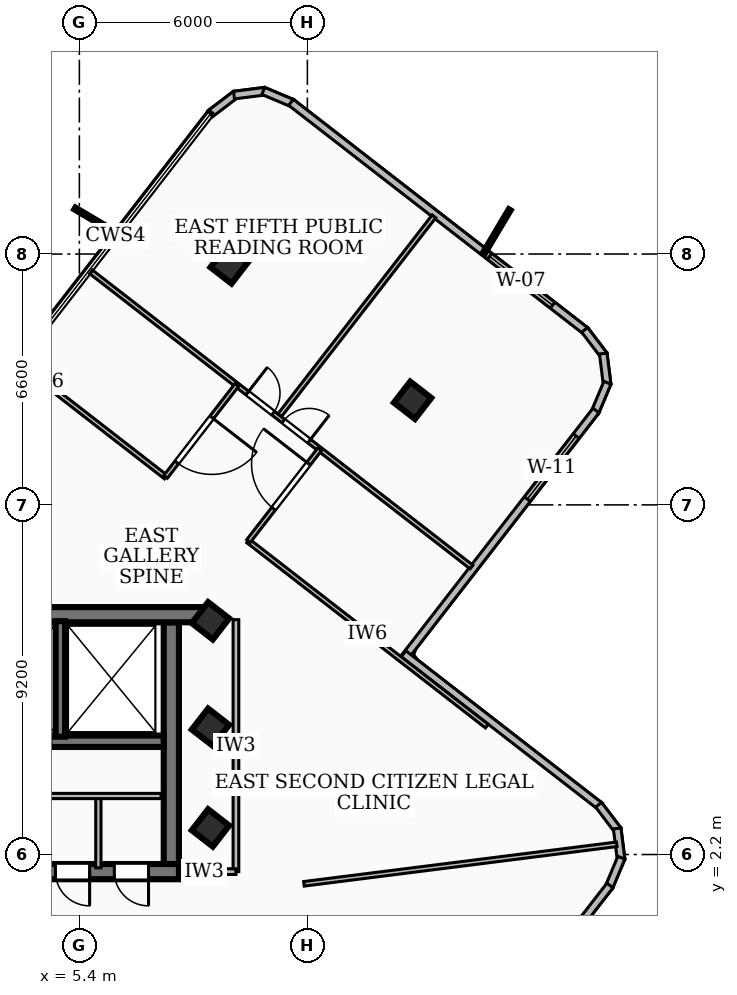
"""IFC4 building model, lengths in metres.
Left out: names, types, materials, properties, quantities, classifications, styles, units other than length and angle.
Written with IfcOpenShell. Run it as: python <this file> out.ifc"""

import sys

from ifc_helpers import new_model, si_unit, direction, frame, frame_2d, origin, origin_2d, place, context, subcontext, project, spatial, rectangle, extrude, element, fill, save


model = new_model("IFC4")
c1 = context("Model", 3, precision=1e-05, world=origin(), true_north=direction((0.0, 1.0)))
c2 = subcontext(c1, "Body", "Model", "MODEL_VIEW")
j1 = project(units=[si_unit("LENGTHUNIT", "METRE"), si_unit("PLANEANGLEUNIT", "RADIAN")], contexts=[c1])
p1 = place(None, origin())
s1 = spatial("IfcSite", under=j1, at=p1, CompositionType="ELEMENT")
p2 = place(p1, origin())
s2 = spatial("IfcBuilding", under=s1, at=p2, CompositionType="ELEMENT")
p3 = place(p2, frame((0.0, 0.0, 261.18)))
s3 = spatial("IfcBuildingStorey", under=s2, at=p3, CompositionType="ELEMENT", Elevation=261.18)
p4 = place(p3, frame((-8.78, 8.51, 0.0), z_axis=(0.0, 0.0, 1.0), x_axis=(1.0, 0.0, 0.0)))
e1 = element("IfcWall", 1, at=p4, inside=s3, PredefinedType="SHEAR", context=c2, shape_type="SweptSolid", body=[
    extrude(rectangle(XDim=17.56, YDim=0.4, at=frame_2d((8.78, 0.0))), origin(), (0.0, 0.0, 1.0), 3.16),
])
p5 = place(p3, frame((8.02, 1.75, 0.0), z_axis=(0.0, 0.0, 1.0), x_axis=(-1.0, 0.0, 0.0)))
e2 = element("IfcWall", 2, at=p5, inside=s3, PredefinedType="SHEAR", context=c2, shape_type="SweptSolid", body=[
    extrude(rectangle(XDim=16.04, YDim=0.4, at=frame_2d((8.02, 0.0))), origin(), (0.0, 0.0, 1.0), 3.16),
])
p6 = place(p5, frame((7.45, 0.0, 0.0)))
e3 = element("IfcOpeningElement", 3, at=p6, cuts=e2, PredefinedType="OPENING", context=c2, shape_type="SweptSolid", body=[
    extrude(rectangle(XDim=1.0, YDim=2.1, at=frame_2d((0.5, 1.05))), frame((0.0, 0.21, 0.0), z_axis=(0.0, -1.0, 0.0), x_axis=(1.0, 0.0, 0.0)), (0.0, 0.0, 1.0), 0.42),
])
p7 = place(p5, frame((14.285, 0.0, 0.0)))
e4 = element("IfcOpeningElement", 4, at=p7, cuts=e2, PredefinedType="OPENING", context=c2, shape_type="SweptSolid", body=[
    extrude(rectangle(XDim=1.05, YDim=2.15, at=frame_2d((0.525, 1.075))), frame((0.0, 0.21, 0.0), z_axis=(0.0, -1.0, 0.0), x_axis=(1.0, 0.0, 0.0)), (0.0, 0.0, 1.0), 0.42),
])
p8 = place(p5, frame((12.725, 0.0, 0.0)))
e5 = element("IfcOpeningElement", 5, at=p8, cuts=e2, PredefinedType="OPENING", context=c2, shape_type="SweptSolid", body=[
    extrude(rectangle(XDim=1.05, YDim=2.15, at=frame_2d((0.525, 1.075))), frame((0.0, 0.21, 0.0), z_axis=(0.0, -1.0, 0.0), x_axis=(1.0, 0.0, 0.0)), (0.0, 0.0, 1.0), 0.42),
])
p9 = place(p5, frame((11.165, 0.0, 0.0)))
e6 = element("IfcOpeningElement", 6, at=p9, cuts=e2, PredefinedType="OPENING", context=c2, shape_type="SweptSolid", body=[
    extrude(rectangle(XDim=1.05, YDim=2.15, at=frame_2d((0.525, 1.075))), frame((0.0, 0.21, 0.0), z_axis=(0.0, -1.0, 0.0), x_axis=(1.0, 0.0, 0.0)), (0.0, 0.0, 1.0), 0.42),
])
p10 = place(p5, frame((3.85, 0.0, 0.0)))
e7 = element("IfcOpeningElement", 7, at=p10, cuts=e2, PredefinedType="OPENING", context=c2, shape_type="SweptSolid", body=[
    extrude(rectangle(XDim=0.9, YDim=2.06, at=frame_2d((0.45, 1.03))), frame((0.0, 0.21, 0.0), z_axis=(0.0, -1.0, 0.0), x_axis=(1.0, 0.0, 0.0)), (0.0, 0.0, 1.0), 0.42),
])
p11 = place(p5, frame((2.35, 0.0, 0.0)))
e8 = element("IfcOpeningElement", 8, at=p11, cuts=e2, PredefinedType="OPENING", context=c2, shape_type="SweptSolid", body=[
    extrude(rectangle(XDim=0.9, YDim=2.06, at=frame_2d((0.45, 1.03))), frame((0.0, 0.21, 0.0), z_axis=(0.0, -1.0, 0.0), x_axis=(1.0, 0.0, 0.0)), (0.0, 0.0, 1.0), 0.42),
])
p12 = place(p5, frame((0.8, 0.0, 0.0)))
e9 = element("IfcOpeningElement", 9, at=p12, cuts=e2, PredefinedType="OPENING", context=c2, shape_type="SweptSolid", body=[
    extrude(rectangle(XDim=0.9, YDim=2.06, at=frame_2d((0.45, 1.03))), frame((0.0, 0.21, 0.0), z_axis=(0.0, -1.0, 0.0), x_axis=(1.0, 0.0, 0.0)), (0.0, 0.0, 1.0), 0.42),
])
p13 = place(p3, frame((7.82, 8.31, 0.0), z_axis=(0.0, 0.0, 1.0), x_axis=(0.0, -1.0, 0.0)))
e10 = element("IfcWall", 10, at=p13, inside=s3, PredefinedType="SHEAR", context=c2, shape_type="SweptSolid", body=[
    extrude(rectangle(XDim=6.36, YDim=0.4, at=frame_2d((3.18, 0.0))), origin(), (0.0, 0.0, 1.0), 3.16),
])
p14 = place(p3, frame((7.62, 5.18, 0.0), z_axis=(0.0, 0.0, 1.0), x_axis=(-1.0, 0.0, 0.0)))
e11 = element("IfcWall", 11, at=p14, inside=s3, PredefinedType="SOLIDWALL", context=c2, shape_type="SweptSolid", body=[
    extrude(rectangle(XDim=15.24, YDim=0.3, at=frame_2d((7.62, 0.0))), origin(), (0.0, 0.0, 1.0), 3.16),
])
p15 = place(p14, frame((5.77, 0.0, 0.0)))
e12 = element("IfcOpeningElement", 12, at=p15, cuts=e11, PredefinedType="OPENING", context=c2, shape_type="SweptSolid", body=[
    extrude(rectangle(XDim=1.1, YDim=2.15, at=frame_2d((0.55, 1.075))), frame((0.0, 0.16, 0.0), z_axis=(0.0, -1.0, 0.0), x_axis=(1.0, 0.0, 0.0)), (0.0, 0.0, 1.0), 0.32),
])
p16 = place(p14, frame((2.97, 0.0, 0.0)))
e13 = element("IfcOpeningElement", 13, at=p16, cuts=e11, PredefinedType="OPENING", context=c2, shape_type="SweptSolid", body=[
    extrude(rectangle(XDim=1.1, YDim=2.15, at=frame_2d((0.55, 1.075))), frame((0.0, 0.16, 0.0), z_axis=(0.0, -1.0, 0.0), x_axis=(1.0, 0.0, 0.0)), (0.0, 0.0, 1.0), 0.32),
])
p17 = place(p14, frame((7.97, 0.0, 0.0)))
e14 = element("IfcOpeningElement", 14, at=p17, cuts=e11, PredefinedType="OPENING", context=c2, shape_type="SweptSolid", body=[
    extrude(rectangle(XDim=1.0, YDim=2.1, at=frame_2d((0.5, 1.05))), frame((0.0, 0.16, 0.0), z_axis=(0.0, -1.0, 0.0), x_axis=(1.0, 0.0, 0.0)), (0.0, 0.0, 1.0), 0.32),
])
p18 = place(p3, frame((4.9, 5.3, 0.0), z_axis=(0.0, 0.0, 1.0), x_axis=(0.0, 1.0, 0.0)))
e15 = element("IfcWall", 15, at=p18, inside=s3, PredefinedType="SOLIDWALL", context=c2, shape_type="SweptSolid", body=[
    extrude(rectangle(XDim=3.04, YDim=0.25, at=frame_2d((1.52, 0.0))), origin(), (0.0, 0.0, 1.0), 3.16),
])
for number, where, z_axis, x_axis in (
    (16, (8.85, 2.9, 0.0), (0.0, 0.0, 1.0), (0.613, 0.79, 0.0)),
    (17, (8.85, 5.55, 0.0), (0.0, 0.0, 1.0), (0.613, 0.79, 0.0)),
    (18, (8.85, 8.35, 0.0), (0.0, 0.0, 1.0), (0.613, 0.79, 0.0)),
    (19, (14.169, 14.152, 0.0), (0.0, 0.0, 1.0), (0.613, 0.79, 0.0)),
    (20, (9.341, 17.714, 0.0), (0.0, 0.0, 1.0), (0.613, 0.79, 0.0)),
):
    element("IfcColumn", number, at=place(p3, frame(where, z_axis=z_axis, x_axis=x_axis)), inside=s3, PredefinedType="COLUMN", context=c2, shape_type="SweptSolid", body=[
        extrude(rectangle(XDim=0.7, YDim=0.7, at=origin_2d()), origin(), (0.0, 0.0, 1.0), 3.42),
    ])
p19 = place(p3, frame((8.846, 21.693, 0.0), z_axis=(0.0, 0.0, 1.0), x_axis=(0.796633253556, 0.604462951163, 0.0)))
e21 = element("IfcWall", 21, at=p19, inside=s3, PredefinedType="SOLIDWALL", context=c2, shape_type="SweptSolid", body=[
    extrude(rectangle(XDim=0.838, YDim=0.2, at=frame_2d((0.419, 0.0))), origin(), (0.0, 0.0, 1.0), 3.16),
])
p20 = place(p3, frame((9.469, 22.182, 0.0), z_axis=(0.0, 0.0, 1.0), x_axis=(0.992163581644, 0.124945697241, 0.0)))
e22 = element("IfcWall", 22, at=p20, inside=s3, PredefinedType="SOLIDWALL", context=c2, shape_type="SweptSolid", body=[
    extrude(rectangle(XDim=0.824, YDim=0.2, at=frame_2d((0.412, 0.0))), origin(), (0.0, 0.0, 1.0), 3.16),
])
p21 = place(p3, frame((10.239, 22.292, 0.0), z_axis=(0.0, 0.0, 1.0), x_axis=(0.92184898946, -0.387549275101, 0.0)))
e23 = element("IfcWall", 23, at=p21, inside=s3, PredefinedType="SOLIDWALL", context=c2, shape_type="SweptSolid", body=[
    extrude(rectangle(XDim=0.838, YDim=0.2, at=frame_2d((0.419, 0.0))), origin(), (0.0, 0.0, 1.0), 3.16),
])
p22 = place(p3, frame((10.969, 21.992, 0.0), z_axis=(0.0, 0.0, 1.0), x_axis=(0.790145127041, -0.612919797537, 0.0)))
e24 = element("IfcWall", 24, at=p22, inside=s3, PredefinedType="SOLIDWALL", context=c2, shape_type="SweptSolid", body=[
    extrude(rectangle(XDim=9.823, YDim=0.2, at=frame_2d((4.912, 0.0))), origin(), (0.0, 0.0, 1.0), 3.16),
])
p23 = place(p22, frame((6.612, 0.0, 0.85)))
e25 = element("IfcOpeningElement", 25, at=p23, cuts=e24, PredefinedType="OPENING", context=c2, shape_type="SweptSolid", body=[
    extrude(rectangle(XDim=2.1, YDim=1.8, at=frame_2d((1.05, 0.9))), frame((0.0, 0.11, 0.0), z_axis=(0.0, -1.0, 0.0), x_axis=(1.0, 0.0, 0.0)), (0.0, 0.0, 1.0), 0.22),
])
p24 = place(p3, frame((18.696, 16.006, 0.0), z_axis=(0.0, 0.0, 1.0), x_axis=(0.604322767077, -0.796739601873, 0.0)))
e26 = element("IfcWall", 26, at=p24, inside=s3, PredefinedType="SOLIDWALL", context=c2, shape_type="SweptSolid", body=[
    extrude(rectangle(XDim=0.839, YDim=0.2, at=frame_2d((0.419, 0.0))), origin(), (0.0, 0.0, 1.0), 3.16),
])
p25 = place(p3, frame((19.185, 15.383, 0.0), z_axis=(0.0, 0.0, 1.0), x_axis=(0.124945697241, -0.992163581644, 0.0)))
e27 = element("IfcWall", 27, at=p25, inside=s3, PredefinedType="SOLIDWALL", context=c2, shape_type="SweptSolid", body=[
    extrude(rectangle(XDim=0.824, YDim=0.2, at=frame_2d((0.412, 0.0))), origin(), (0.0, 0.0, 1.0), 3.16),
])
p26 = place(p3, frame((19.295, 14.613, 0.0), z_axis=(0.0, 0.0, 1.0), x_axis=(-0.387549275101, -0.92184898946, 0.0)))
e28 = element("IfcWall", 28, at=p26, inside=s3, PredefinedType="SOLIDWALL", context=c2, shape_type="SweptSolid", body=[
    extrude(rectangle(XDim=0.838, YDim=0.2, at=frame_2d((0.419, 0.0))), origin(), (0.0, 0.0, 1.0), 3.16),
])
p27 = place(p3, frame((18.995, 13.883, 0.0), z_axis=(0.0, 0.0, 1.0), x_axis=(-0.612894114019, -0.790165049215, 0.0)))
e29 = element("IfcWall", 29, at=p27, inside=s3, PredefinedType="SOLIDWALL", context=c2, shape_type="SweptSolid", body=[
    extrude(rectangle(XDim=8.241, YDim=0.2, at=frame_2d((4.121, 0.0))), origin(), (0.0, 0.0, 1.0), 3.16),
])
p28 = place(p27, frame((0.85, 0.0, 0.85)))
e30 = element("IfcOpeningElement", 30, at=p28, cuts=e29, PredefinedType="OPENING", context=c2, shape_type="SweptSolid", body=[
    extrude(rectangle(XDim=2.1, YDim=1.6, at=frame_2d((1.05, 0.8))), frame((0.0, 0.11, 0.0), z_axis=(0.0, -1.0, 0.0), x_axis=(1.0, 0.0, 0.0)), (0.0, 0.0, 1.0), 0.22),
])
p29 = place(p3, frame((13.93, 7.483, 0.0), z_axis=(0.0, 0.0, 1.0), x_axis=(0.790217588081, -0.612826373036, 0.0)))
e31 = element("IfcWall", 31, at=p29, inside=s3, PredefinedType="SOLIDWALL", context=c2, shape_type="SweptSolid", body=[
    extrude(rectangle(XDim=6.542, YDim=0.2, at=frame_2d((3.271, 0.0))), origin(), (0.0, 0.0, 1.0), 3.16),
])
p30 = place(p3, frame((19.064, 3.509, 0.0), z_axis=(0.0, 0.0, 1.0), x_axis=(0.603908166539, -0.797053904317, 0.0)))
e32 = element("IfcWall", 32, at=p30, inside=s3, PredefinedType="SOLIDWALL", context=c2, shape_type="SweptSolid", body=[
    extrude(rectangle(XDim=0.838, YDim=0.2, at=frame_2d((0.419, 0.0))), origin(), (0.0, 0.0, 1.0), 3.16),
])
p31 = place(p3, frame((19.552, 2.886, 0.0), z_axis=(0.0, 0.0, 1.0), x_axis=(0.124799052175, -0.992182038023, 0.0)))
e33 = element("IfcWall", 33, at=p31, inside=s3, PredefinedType="SOLIDWALL", context=c2, shape_type="SweptSolid", body=[
    extrude(rectangle(XDim=0.825, YDim=0.2, at=frame_2d((0.413, 0.0))), origin(), (0.0, 0.0, 1.0), 3.16),
])
p32 = place(p3, frame((19.662, 2.115, 0.0), z_axis=(0.0, 0.0, 1.0), x_axis=(-0.388213349612, -0.921569528133, 0.0)))
e34 = element("IfcWall", 34, at=p32, inside=s3, PredefinedType="SOLIDWALL", context=c2, shape_type="SweptSolid", body=[
    extrude(rectangle(XDim=0.838, YDim=0.2, at=frame_2d((0.419, 0.0))), origin(), (0.0, 0.0, 1.0), 3.16),
])
p33 = place(p3, frame((19.362, 1.386, 0.0), z_axis=(0.0, 0.0, 1.0), x_axis=(-0.613007625303, -0.790076990755, 0.0)))
e35 = element("IfcWall", 35, at=p33, inside=s3, PredefinedType="SOLIDWALL", context=c2, shape_type="SweptSolid", body=[
    extrude(rectangle(XDim=6.742, YDim=0.2, at=frame_2d((3.371, 0.0))), origin(), (0.0, 0.0, 1.0), 3.16),
])
p34 = place(p3, frame((2.9, 3.74, 0.0), z_axis=(0.0, 0.0, 1.0), x_axis=(1.0, 0.0, 0.0)))
e36 = element("IfcWall", 36, at=p34, inside=s3, PredefinedType="PARTITIONING", context=c2, shape_type="SweptSolid", body=[
    extrude(rectangle(XDim=4.65, YDim=0.138, at=frame_2d((2.325, 0.0))), origin(), (0.0, 0.0, 1.0), 3.16),
])
p35 = place(p3, frame((5.9, 1.85, 0.0), z_axis=(0.0, 0.0, 1.0), x_axis=(0.0, 1.0, 0.0)))
e37 = element("IfcWall", 37, at=p35, inside=s3, PredefinedType="PARTITIONING", context=c2, shape_type="SweptSolid", body=[
    extrude(rectangle(XDim=1.89, YDim=0.138, at=frame_2d((0.945, 0.0))), origin(), (0.0, 0.0, 1.0), 2.39),
])
p36 = place(p3, frame((9.52, 1.75, 0.0), z_axis=(0.0, 0.0, 1.0), x_axis=(0.0, 1.0, 0.0)))
e38 = element("IfcWall", 38, at=p36, inside=s3, PredefinedType="PARTITIONING", context=c2, shape_type="SweptSolid", body=[
    extrude(rectangle(XDim=6.63, YDim=0.15, at=frame_2d((3.315, 0.0))), origin(), (0.0, 0.0, 1.0), 3.16),
])
p37 = place(p3, frame((7.85, 1.75, 0.0), z_axis=(0.0, 0.0, 1.0), x_axis=(1.0, 0.0, 0.0)))
e39 = element("IfcWall", 39, at=p37, inside=s3, PredefinedType="PARTITIONING", context=c2, shape_type="SweptSolid", body=[
    extrude(rectangle(XDim=1.67, YDim=0.15, at=frame_2d((0.835, 0.0))), origin(), (0.0, 0.0, 1.0), 2.39),
])
p38 = place(p3, frame((11.31, 1.429, 0.0), z_axis=(0.0, 0.0, 1.0), x_axis=(0.992107592132, 0.125389495712, 0.0)))
e40 = element("IfcWall", 40, at=p38, inside=s3, PredefinedType="PARTITIONING", context=c2, shape_type="SweptSolid", body=[
    extrude(rectangle(XDim=8.294, YDim=0.12, at=frame_2d((4.147, 0.0))), origin(), (0.0, 0.0, 1.0), 3.16),
])
p39 = place(p3, frame((7.676, 12.131, 0.0), z_axis=(0.0, 0.0, 1.0), x_axis=(-0.790137186805, 0.61293003355, 0.0)))
e41 = element("IfcWall", 41, at=p39, inside=s3, PredefinedType="PARTITIONING", context=c2, shape_type="SweptSolid", body=[
    extrude(rectangle(XDim=8.149, YDim=0.12, at=frame_2d((4.075, 0.0))), origin(), (0.0, 0.0, 1.0), 3.16),
])
p40 = place(p3, frame((16.122, 5.578, 0.0), z_axis=(0.0, 0.0, 1.0), x_axis=(-0.7900346363, 0.613062210094, 0.0)))
e42 = element("IfcWall", 42, at=p40, inside=s3, PredefinedType="PARTITIONING", context=c2, shape_type="SweptSolid", body=[
    extrude(rectangle(XDim=7.95, YDim=0.12, at=frame_2d((3.975, 0.0))), origin(), (0.0, 0.0, 1.0), 2.53),
])
p41 = place(p3, frame((9.544, 14.555, 0.0), z_axis=(0.0, 0.0, 1.0), x_axis=(-0.612990234131, -0.79009048397, 0.0)))
e43 = element("IfcWall", 43, at=p41, inside=s3, PredefinedType="PARTITIONING", context=c2, shape_type="SweptSolid", body=[
    extrude(rectangle(XDim=3.06, YDim=0.12, at=frame_2d((1.53, 0.0))), origin(), (0.0, 0.0, 1.0), 2.53),
])
p42 = place(p41, frame((1.08, 0.0, 0.0)))
e44 = element("IfcOpeningElement", 44, at=p42, cuts=e43, PredefinedType="OPENING", context=c2, shape_type="SweptSolid", body=[
    extrude(rectangle(XDim=1.5, YDim=2.12, at=frame_2d((0.75, 1.06))), frame((0.0, 0.07, 0.0), z_axis=(0.0, -1.0, 0.0), x_axis=(1.0, 0.0, 0.0)), (0.0, 0.0, 1.0), 0.14),
])
p43 = place(p3, frame((9.849, 10.446, 0.0), z_axis=(0.0, 0.0, 1.0), x_axis=(0.612945563076, 0.790125139902, 0.0)))
e45 = element("IfcWall", 45, at=p43, inside=s3, PredefinedType="PARTITIONING", context=c2, shape_type="SweptSolid", body=[
    extrude(rectangle(XDim=3.059, YDim=0.12, at=frame_2d((1.53, 0.0))), origin(), (0.0, 0.0, 1.0), 3.16),
])
p44 = place(p43, frame((1.08, 0.0, 0.0)))
e46 = element("IfcOpeningElement", 46, at=p44, cuts=e45, PredefinedType="OPENING", context=c2, shape_type="SweptSolid", body=[
    extrude(rectangle(XDim=1.5, YDim=2.12, at=frame_2d((0.75, 1.06))), frame((0.0, 0.07, 0.0), z_axis=(0.0, -1.0, 0.0), x_axis=(1.0, 0.0, 0.0)), (0.0, 0.0, 1.0), 0.14),
])
p45 = place(p3, frame((10.671, 13.757, 0.0), z_axis=(0.0, 0.0, 1.0), x_axis=(0.61292966537, 0.790137472412, 0.0)))
e47 = element("IfcWall", 47, at=p45, inside=s3, PredefinedType="PARTITIONING", context=c2, shape_type="SweptSolid", body=[
    extrude(rectangle(XDim=6.624, YDim=0.12, at=frame_2d((3.312, 0.0))), origin(), (0.0, 0.0, 1.0), 3.16),
])
p46 = place(p3, frame((5.707, 17.531, 0.0), z_axis=(0.0, 0.0, 1.0), x_axis=(0.790153529347, -0.612908965557, 0.0)))
e48 = element("IfcWall", 48, at=p46, inside=s3, PredefinedType="PARTITIONING", context=c2, shape_type="SweptSolid", body=[
    extrude(rectangle(XDim=12.671, YDim=0.12, at=frame_2d((6.335, 0.0))), origin(), (0.0, 0.0, 1.0), 2.53),
])
p47 = place(p46, frame((6.405, 0.0, 0.0)))
e49 = element("IfcOpeningElement", 49, at=p47, cuts=e48, PredefinedType="OPENING", context=c2, shape_type="SweptSolid", body=[
    extrude(rectangle(XDim=0.86, YDim=2.04, at=frame_2d((0.43, 1.02))), frame((0.0, 0.07, 0.0), z_axis=(0.0, -1.0, 0.0), x_axis=(1.0, 0.0, 0.0)), (0.0, 0.0, 1.0), 0.14),
])
p48 = place(p46, frame((5.205, 0.0, 0.0)))
e50 = element("IfcOpeningElement", 50, at=p48, cuts=e48, PredefinedType="OPENING", context=c2, shape_type="SweptSolid", body=[
    extrude(rectangle(XDim=0.86, YDim=2.04, at=frame_2d((0.43, 1.02))), frame((0.0, 0.07, 0.0), z_axis=(0.0, -1.0, 0.0), x_axis=(1.0, 0.0, 0.0)), (0.0, 0.0, 1.0), 0.14),
])
p49 = place(p23, origin())
e51 = element("IfcWindow", 51, at=p49, inside=s3, PartitioningType="SINGLE_PANEL", PredefinedType="WINDOW", context=c2, shape_type="SweptSolid", body=[
    extrude(rectangle(XDim=2.1, YDim=1.8, at=frame_2d((1.05, 0.9))), frame((0.0, 0.03, 0.0), z_axis=(0.0, -1.0, 0.0), x_axis=(1.0, 0.0, 0.0)), (0.0, 0.0, 1.0), 0.06),
])
fill(e25, e51)
p50 = place(p28, origin())
e52 = element("IfcWindow", 52, at=p50, inside=s3, PartitioningType="SINGLE_PANEL", PredefinedType="WINDOW", context=c2, shape_type="SweptSolid", body=[
    extrude(rectangle(XDim=2.1, YDim=1.6, at=frame_2d((1.05, 0.8))), frame((0.0, 0.03, 0.0), z_axis=(0.0, -1.0, 0.0), x_axis=(1.0, 0.0, 0.0)), (0.0, 0.0, 1.0), 0.06),
])
fill(e30, e52)
p51 = place(p11, origin())
e53 = element("IfcDoor", 53, at=p51, inside=s3, OperationType="SINGLE_SWING_LEFT", PredefinedType="DOOR", context=c2, shape_type="SweptSolid", body=[
    extrude(rectangle(XDim=0.9, YDim=2.06, at=frame_2d((0.45, 1.03))), frame((0.0, 0.025, 0.0), z_axis=(0.0, -1.0, 0.0), x_axis=(1.0, 0.0, 0.0)), (0.0, 0.0, 1.0), 0.05),
])
fill(e8, e53)
p52 = place(p12, origin())
e54 = element("IfcDoor", 54, at=p52, inside=s3, OperationType="SINGLE_SWING_LEFT", PredefinedType="DOOR", context=c2, shape_type="SweptSolid", body=[
    extrude(rectangle(XDim=0.9, YDim=2.06, at=frame_2d((0.45, 1.03))), frame((0.0, 0.025, 0.0), z_axis=(0.0, -1.0, 0.0), x_axis=(1.0, 0.0, 0.0)), (0.0, 0.0, 1.0), 0.05),
])
fill(e9, e54)
p53 = place(p42, origin())
e55 = element("IfcDoor", 55, at=p53, inside=s3, OperationType="SINGLE_SWING_LEFT", PredefinedType="DOOR", context=c2, shape_type="SweptSolid", body=[
    extrude(rectangle(XDim=1.5, YDim=2.12, at=frame_2d((0.75, 1.06))), frame((0.0, 0.025, 0.0), z_axis=(0.0, -1.0, 0.0), x_axis=(1.0, 0.0, 0.0)), (0.0, 0.0, 1.0), 0.05),
])
fill(e44, e55)
p54 = place(p44, origin())
e56 = element("IfcDoor", 56, at=p54, inside=s3, OperationType="SINGLE_SWING_RIGHT", PredefinedType="DOOR", context=c2, shape_type="SweptSolid", body=[
    extrude(rectangle(XDim=1.5, YDim=2.12, at=frame_2d((0.75, 1.06))), frame((0.0, 0.025, 0.0), z_axis=(0.0, -1.0, 0.0), x_axis=(1.0, 0.0, 0.0)), (0.0, 0.0, 1.0), 0.05),
])
fill(e46, e56)
p55 = place(p47, origin())
e57 = element("IfcDoor", 57, at=p55, inside=s3, OperationType="SINGLE_SWING_RIGHT", PredefinedType="DOOR", context=c2, shape_type="SweptSolid", body=[
    extrude(rectangle(XDim=0.86, YDim=2.04, at=frame_2d((0.43, 1.02))), frame((0.0, 0.025, 0.0), z_axis=(0.0, -1.0, 0.0), x_axis=(1.0, 0.0, 0.0)), (0.0, 0.0, 1.0), 0.05),
])
fill(e49, e57)
p56 = place(p48, origin())
e58 = element("IfcDoor", 58, at=p56, inside=s3, OperationType="SINGLE_SWING_LEFT", PredefinedType="DOOR", context=c2, shape_type="SweptSolid", body=[
    extrude(rectangle(XDim=0.86, YDim=2.04, at=frame_2d((0.43, 1.02))), frame((0.0, 0.025, 0.0), z_axis=(0.0, -1.0, 0.0), x_axis=(1.0, 0.0, 0.0)), (0.0, 0.0, 1.0), 0.05),
])
fill(e50, e58)
save(model, sys.argv[1])
